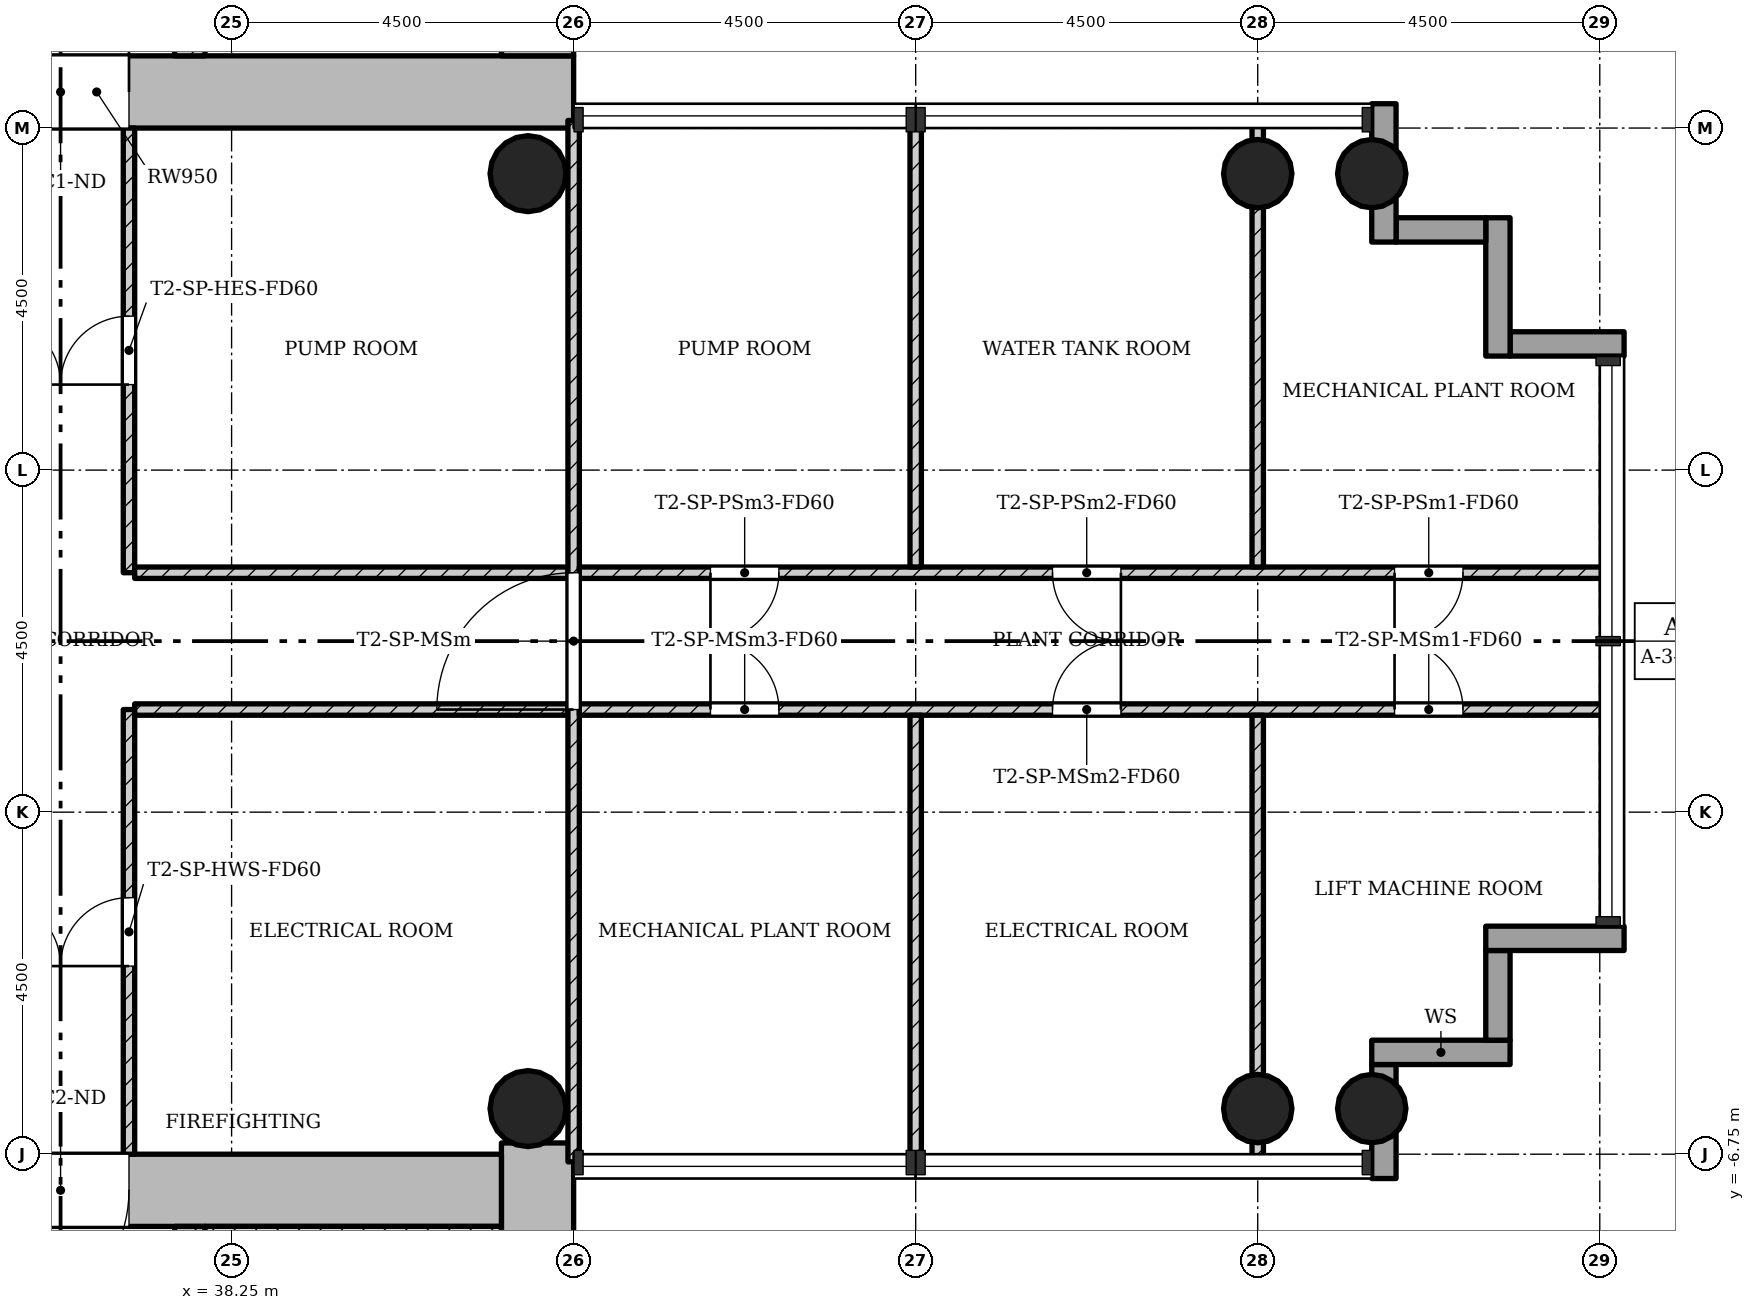
"""IFC4 building model, lengths in metres.
Left out: names, types, materials, properties, quantities, classifications, styles, units other than length and angle.
Written with IfcOpenShell. Run it as: python <this file> out.ifc"""

import sys

from ifc_helpers import new_model, si_unit, direction, frame, frame_2d, origin, origin_2d, place, context, subcontext, project, spatial, rectangle, hollow_circle, extrude, element, fill, save


model = new_model("IFC4")
c1 = context("Model", 3, precision=1e-05, world=origin(), true_north=direction((0.0, 1.0)))
c2 = subcontext(c1, "Body", "Model", "MODEL_VIEW")
j1 = project(units=[si_unit("LENGTHUNIT", "METRE"), si_unit("PLANEANGLEUNIT", "RADIAN")], contexts=[c1])
p1 = place(None, origin())
s1 = spatial("IfcSite", under=j1, at=p1, CompositionType="ELEMENT")
p2 = place(p1, origin())
s2 = spatial("IfcBuilding", under=s1, at=p2, CompositionType="ELEMENT")
p3 = place(p2, frame((0.0, 0.0, 124.2)))
s3 = spatial("IfcBuildingStorey", under=s2, at=p3, CompositionType="ELEMENT", Elevation=124.2)
p4 = place(p3, frame((30.2, 7.225, 0.0), z_axis=(0.0, 0.0, 1.0), x_axis=(1.0, 0.0, 0.0)))
e1 = element("IfcWall", 1, at=p4, inside=s3, PredefinedType="SHEAR", context=c2, shape_type="SweptSolid", body=[
    extrude(rectangle(XDim=12.55, YDim=0.95, at=frame_2d((6.275, 0.0))), origin(), (0.0, 0.0, 1.0), 4.5),
])
p5 = place(p4, frame((4.9, 0.0, 0.0)))
e2 = element("IfcOpeningElement", 2, at=p5, cuts=e1, PredefinedType="OPENING", context=c2, shape_type="SweptSolid", body=[
    extrude(rectangle(XDim=1.8, YDim=2.1, at=frame_2d((0.9, 1.05))), frame((0.0, 0.485, 0.0), z_axis=(0.0, -1.0, 0.0), x_axis=(1.0, 0.0, 0.0)), (0.0, 0.0, 1.0), 0.97),
])
p6 = place(p3, frame((42.275, 7.7, 0.0), z_axis=(0.0, 0.0, 1.0), x_axis=(0.0, 1.0, 0.0)))
e3 = element("IfcWall", 3, at=p6, inside=s3, PredefinedType="SHEAR", context=c2, shape_type="SweptSolid", body=[
    extrude(rectangle(XDim=8.05, YDim=0.95, at=frame_2d((4.025, 0.0))), origin(), (0.0, 0.0, 1.0), 4.5),
])
p7 = place(p3, frame((37.7, 7.7, 0.0), z_axis=(0.0, 0.0, 1.0), x_axis=(0.0, 1.0, 0.0)))
e4 = element("IfcWall", 4, at=p7, inside=s3, PredefinedType="SHEAR", context=c2, shape_type="SweptSolid", body=[
    extrude(rectangle(XDim=7.1, YDim=0.4, at=frame_2d((3.55, 0.0))), origin(), (0.0, 0.0, 1.0), 4.5),
])
p8 = place(p3, frame((42.275, -14.8, 0.0), z_axis=(0.0, 0.0, 1.0), x_axis=(0.0, 1.0, 0.0)))
e5 = element("IfcWall", 5, at=p8, inside=s3, PredefinedType="SHEAR", context=c2, shape_type="SweptSolid", body=[
    extrude(rectangle(XDim=8.198, YDim=0.95, at=frame_2d((4.099, 0.0))), origin(), (0.0, 0.0, 1.0), 4.5),
])
p9 = place(p3, frame((41.8, -7.225, 0.0), z_axis=(0.0, 0.0, 1.0), x_axis=(-1.0, 0.0, 0.0)))
e6 = element("IfcWall", 6, at=p9, inside=s3, PredefinedType="SHEAR", context=c2, shape_type="SweptSolid", body=[
    extrude(rectangle(XDim=12.55, YDim=0.95, at=frame_2d((6.275, 0.0))), origin(), (0.0, 0.0, 1.0), 4.5),
])
p10 = place(p9, frame((4.9, 0.0, 0.0)))
e7 = element("IfcOpeningElement", 7, at=p10, cuts=e6, PredefinedType="OPENING", context=c2, shape_type="SweptSolid", body=[
    extrude(rectangle(XDim=1.8, YDim=2.1, at=frame_2d((0.9, 1.05))), frame((0.0, 0.485, 0.0), z_axis=(0.0, -1.0, 0.0), x_axis=(1.0, 0.0, 0.0)), (0.0, 0.0, 1.0), 0.97),
])
p11 = place(p3, frame((37.7, -14.8, 0.0), z_axis=(0.0, 0.0, 1.0), x_axis=(0.0, 1.0, 0.0)))
e8 = element("IfcWall", 8, at=p11, inside=s3, PredefinedType="SHEAR", context=c2, shape_type="SweptSolid", body=[
    extrude(rectangle(XDim=7.1, YDim=0.4, at=frame_2d((3.55, 0.0))), origin(), (0.0, 0.0, 1.0), 4.5),
])
p12 = place(p11, frame((5.5, 0.0, 0.0)))
e9 = element("IfcOpeningElement", 9, at=p12, cuts=e8, PredefinedType="OPENING", context=c2, shape_type="SweptSolid", body=[
    extrude(rectangle(XDim=0.9, YDim=2.1, at=frame_2d((0.45, 1.05))), frame((0.0, 0.21, 0.0), z_axis=(0.0, -1.0, 0.0), x_axis=(1.0, 0.0, 0.0)), (0.0, 0.0, 1.0), 0.42),
])
for number, where, z_axis, x_axis in (
    (10, (51.75, -6.15, 0.0), (0.0, 0.0, 1.0), (1.0, 0.0, 0.0)),
    (11, (51.75, 6.15, 0.0), (0.0, 0.0, 1.0), (1.0, 0.0, 0.0)),
    (12, (53.25, -6.15, 0.0), (0.0, 0.0, 1.0), (1.0, 0.0, 0.0)),
    (13, (53.25, 6.15, 0.0), (0.0, 0.0, 1.0), (1.0, 0.0, 0.0)),
):
    element("IfcColumn", number, at=place(p3, frame(where, z_axis=z_axis, x_axis=x_axis)), inside=s3, PredefinedType="COLUMN", context=c2, shape_type="SweptSolid", body=[
        extrude(hollow_circle(Radius=0.45, WallThickness=0.032, at=origin_2d()), origin(), (0.0, 0.0, 1.0), 4.5),
    ])
for number, where, z_axis, x_axis in (
    (14, (42.15, -6.15, 0.0), (0.0, 0.0, 1.0), (1.0, 0.0, 0.0)),
    (15, (42.15, 6.15, 0.0), (0.0, 0.0, 1.0), (1.0, 0.0, 0.0)),
):
    element("IfcColumn", number, at=place(p3, frame(where, z_axis=z_axis, x_axis=x_axis)), inside=s3, PredefinedType="COLUMN", context=c2, shape_type="SweptSolid", body=[
        extrude(hollow_circle(Radius=0.5, WallThickness=0.036, at=origin_2d()), origin(), (0.0, 0.0, 1.0), 4.5),
    ])
p13 = place(p3, frame((53.41, -7.07, -0.3), z_axis=(0.0, 0.0, 1.0), x_axis=(0.0, 1.0, 0.0)))
e16 = element("IfcWall", 16, at=p13, inside=s3, PredefinedType="STANDARD", context=c2, shape_type="SweptSolid", body=[
    extrude(rectangle(XDim=1.5, YDim=0.32, at=frame_2d((0.75, 0.0))), origin(), (0.0, 0.0, 1.0), 4.5),
])
p14 = place(p3, frame((53.25, -5.41, -0.3), z_axis=(0.0, 0.0, 1.0), x_axis=(1.0, 0.0, 0.0)))
e17 = element("IfcWall", 17, at=p14, inside=s3, PredefinedType="STANDARD", context=c2, shape_type="SweptSolid", body=[
    extrude(rectangle(XDim=1.82, YDim=0.32, at=frame_2d((0.91, 0.0))), origin(), (0.0, 0.0, 1.0), 4.5),
])
p15 = place(p3, frame((54.91, -5.25, -0.3), z_axis=(0.0, 0.0, 1.0), x_axis=(0.0, 1.0, 0.0)))
e18 = element("IfcWall", 18, at=p15, inside=s3, PredefinedType="STANDARD", context=c2, shape_type="SweptSolid", body=[
    extrude(rectangle(XDim=1.18, YDim=0.32, at=frame_2d((0.59, 0.0))), origin(), (0.0, 0.0, 1.0), 4.5),
])
p16 = place(p3, frame((54.75, -3.91, -0.3), z_axis=(0.0, 0.0, 1.0), x_axis=(1.0, 0.0, 0.0)))
e19 = element("IfcWall", 19, at=p16, inside=s3, PredefinedType="STANDARD", context=c2, shape_type="SweptSolid", body=[
    extrude(rectangle(XDim=1.82, YDim=0.32, at=frame_2d((0.91, 0.0))), origin(), (0.0, 0.0, 1.0), 4.5),
])
p17 = place(p3, frame((56.57, 3.91, -0.3), z_axis=(0.0, 0.0, 1.0), x_axis=(-1.0, 0.0, 0.0)))
e20 = element("IfcWall", 20, at=p17, inside=s3, PredefinedType="STANDARD", context=c2, shape_type="SweptSolid", body=[
    extrude(rectangle(XDim=1.5, YDim=0.32, at=frame_2d((0.75, 0.0))), origin(), (0.0, 0.0, 1.0), 4.5),
])
p18 = place(p3, frame((54.91, 3.75, -0.3), z_axis=(0.0, 0.0, 1.0), x_axis=(0.0, 1.0, 0.0)))
e21 = element("IfcWall", 21, at=p18, inside=s3, PredefinedType="STANDARD", context=c2, shape_type="SweptSolid", body=[
    extrude(rectangle(XDim=1.82, YDim=0.32, at=frame_2d((0.91, 0.0))), origin(), (0.0, 0.0, 1.0), 4.5),
])
p19 = place(p3, frame((54.75, 5.41, -0.3), z_axis=(0.0, 0.0, 1.0), x_axis=(-1.0, 0.0, 0.0)))
e22 = element("IfcWall", 22, at=p19, inside=s3, PredefinedType="STANDARD", context=c2, shape_type="SweptSolid", body=[
    extrude(rectangle(XDim=1.18, YDim=0.32, at=frame_2d((0.59, 0.0))), origin(), (0.0, 0.0, 1.0), 4.5),
])
p20 = place(p3, frame((53.41, 5.25, -0.3), z_axis=(0.0, 0.0, 1.0), x_axis=(0.0, 1.0, 0.0)))
e23 = element("IfcWall", 23, at=p20, inside=s3, PredefinedType="STANDARD", context=c2, shape_type="SweptSolid", body=[
    extrude(rectangle(XDim=1.82, YDim=0.32, at=frame_2d((0.91, 0.0))), origin(), (0.0, 0.0, 1.0), 4.5),
])
p21 = place(p3, frame((36.9, 0.9, 0.0), z_axis=(0.0, 0.0, 1.0), x_axis=(0.0, 1.0, 0.0)))
e24 = element("IfcWall", 24, at=p21, inside=s3, PredefinedType="PARTITIONING", context=c2, shape_type="SweptSolid", body=[
    extrude(rectangle(XDim=5.85, YDim=0.15, at=frame_2d((2.925, 0.0))), origin(), (0.0, 0.0, 1.0), 4.1),
])
p22 = place(p21, frame((2.475, 0.0, 0.0)))
e25 = element("IfcOpeningElement", 25, at=p22, cuts=e24, PredefinedType="OPENING", context=c2, shape_type="SweptSolid", body=[
    extrude(rectangle(XDim=0.9, YDim=2.1, at=frame_2d((0.45, 1.05))), frame((0.0, 0.085, 0.0), z_axis=(0.0, -1.0, 0.0), x_axis=(1.0, 0.0, 0.0)), (0.0, 0.0, 1.0), 0.17),
])
p23 = place(p3, frame((42.675, 0.9, 0.0), z_axis=(0.0, 0.0, 1.0), x_axis=(-1.0, 0.0, 0.0)))
e26 = element("IfcWall", 26, at=p23, inside=s3, PredefinedType="PARTITIONING", context=c2, shape_type="SweptSolid", body=[
    extrude(rectangle(XDim=5.7, YDim=0.15, at=frame_2d((2.85, 0.0))), origin(), (0.0, 0.0, 1.0), 4.1),
])
p24 = place(p3, frame((36.9, -6.75, 0.0), z_axis=(0.0, 0.0, 1.0), x_axis=(0.0, 1.0, 0.0)))
e27 = element("IfcWall", 27, at=p24, inside=s3, PredefinedType="PARTITIONING", context=c2, shape_type="SweptSolid", body=[
    extrude(rectangle(XDim=5.85, YDim=0.15, at=frame_2d((2.925, 0.0))), origin(), (0.0, 0.0, 1.0), 4.1),
])
p25 = place(p24, frame((2.475, 0.0, 0.0)))
e28 = element("IfcOpeningElement", 28, at=p25, cuts=e27, PredefinedType="OPENING", context=c2, shape_type="SweptSolid", body=[
    extrude(rectangle(XDim=0.9, YDim=2.1, at=frame_2d((0.45, 1.05))), frame((0.0, 0.085, 0.0), z_axis=(0.0, -1.0, 0.0), x_axis=(1.0, 0.0, 0.0)), (0.0, 0.0, 1.0), 0.17),
])
p26 = place(p3, frame((42.675, -0.9, 0.0), z_axis=(0.0, 0.0, 1.0), x_axis=(-1.0, 0.0, 0.0)))
e29 = element("IfcWall", 29, at=p26, inside=s3, PredefinedType="PARTITIONING", context=c2, shape_type="SweptSolid", body=[
    extrude(rectangle(XDim=5.7, YDim=0.15, at=frame_2d((2.85, 0.0))), origin(), (0.0, 0.0, 1.0), 4.1),
])
p27 = place(p3, frame((42.75, -6.85, 0.0), z_axis=(0.0, 0.0, 1.0), x_axis=(0.0, 1.0, 0.0)))
e30 = element("IfcWall", 30, at=p27, inside=s3, PredefinedType="PARTITIONING", context=c2, shape_type="SweptSolid", body=[
    extrude(rectangle(XDim=13.7, YDim=0.15, at=frame_2d((6.85, 0.0))), origin(), (0.0, 0.0, 1.0), 4.1),
])
p28 = place(p27, frame((5.95, 0.0, 0.0)))
e31 = element("IfcOpeningElement", 31, at=p28, cuts=e30, PredefinedType="OPENING", context=c2, shape_type="SweptSolid", body=[
    extrude(rectangle(XDim=1.8, YDim=2.1, at=frame_2d((0.9, 1.05))), frame((0.0, 0.085, 0.0), z_axis=(0.0, -1.0, 0.0), x_axis=(1.0, 0.0, 0.0)), (0.0, 0.0, 1.0), 0.17),
])
p29 = place(p3, frame((56.35, 0.9, 0.0), z_axis=(0.0, 0.0, 1.0), x_axis=(-1.0, 0.0, 0.0)))
e32 = element("IfcWall", 32, at=p29, inside=s3, PredefinedType="PARTITIONING", context=c2, shape_type="SweptSolid", body=[
    extrude(rectangle(XDim=13.525, YDim=0.15, at=frame_2d((6.763, 0.0))), origin(), (0.0, 0.0, 1.0), 4.1),
])
p30 = place(p29, frame((1.9, 0.0, 0.0)))
e33 = element("IfcOpeningElement", 33, at=p30, cuts=e32, PredefinedType="OPENING", context=c2, shape_type="SweptSolid", body=[
    extrude(rectangle(XDim=0.9, YDim=2.1, at=frame_2d((0.45, 1.05))), frame((0.0, 0.085, 0.0), z_axis=(0.0, -1.0, 0.0), x_axis=(1.0, 0.0, 0.0)), (0.0, 0.0, 1.0), 0.17),
])
p31 = place(p29, frame((6.4, 0.0, 0.0)))
e34 = element("IfcOpeningElement", 34, at=p31, cuts=e32, PredefinedType="OPENING", context=c2, shape_type="SweptSolid", body=[
    extrude(rectangle(XDim=0.9, YDim=2.1, at=frame_2d((0.45, 1.05))), frame((0.0, 0.085, 0.0), z_axis=(0.0, -1.0, 0.0), x_axis=(1.0, 0.0, 0.0)), (0.0, 0.0, 1.0), 0.17),
])
p32 = place(p29, frame((10.9, 0.0, 0.0)))
e35 = element("IfcOpeningElement", 35, at=p32, cuts=e32, PredefinedType="OPENING", context=c2, shape_type="SweptSolid", body=[
    extrude(rectangle(XDim=0.9, YDim=2.1, at=frame_2d((0.45, 1.05))), frame((0.0, 0.085, 0.0), z_axis=(0.0, -1.0, 0.0), x_axis=(1.0, 0.0, 0.0)), (0.0, 0.0, 1.0), 0.17),
])
for number, where, z_axis, x_axis in (
    (36, (51.75, 0.975, 0.0), (0.0, 0.0, 1.0), (0.0, 1.0, 0.0)),
    (37, (47.25, 0.975, 0.0), (0.0, 0.0, 1.0), (0.0, 1.0, 0.0)),
):
    element("IfcWall", number, at=place(p3, frame(where, z_axis=z_axis, x_axis=x_axis)), inside=s3, PredefinedType="PARTITIONING", context=c2, shape_type="SweptSolid", body=[
        extrude(rectangle(XDim=5.875, YDim=0.15, at=frame_2d((2.938, 0.0))), origin(), (0.0, 0.0, 1.0), 4.1),
    ])
p33 = place(p3, frame((56.35, -0.9, 0.0), z_axis=(0.0, 0.0, 1.0), x_axis=(-1.0, 0.0, 0.0)))
e38 = element("IfcWall", 38, at=p33, inside=s3, PredefinedType="PARTITIONING", context=c2, shape_type="SweptSolid", body=[
    extrude(rectangle(XDim=13.525, YDim=0.15, at=frame_2d((6.763, 0.0))), origin(), (0.0, 0.0, 1.0), 4.1),
])
p34 = place(p33, frame((1.9, 0.0, 0.0)))
e39 = element("IfcOpeningElement", 39, at=p34, cuts=e38, PredefinedType="OPENING", context=c2, shape_type="SweptSolid", body=[
    extrude(rectangle(XDim=0.9, YDim=2.1, at=frame_2d((0.45, 1.05))), frame((0.0, 0.085, 0.0), z_axis=(0.0, -1.0, 0.0), x_axis=(1.0, 0.0, 0.0)), (0.0, 0.0, 1.0), 0.17),
])
p35 = place(p33, frame((6.4, 0.0, 0.0)))
e40 = element("IfcOpeningElement", 40, at=p35, cuts=e38, PredefinedType="OPENING", context=c2, shape_type="SweptSolid", body=[
    extrude(rectangle(XDim=0.9, YDim=2.1, at=frame_2d((0.45, 1.05))), frame((0.0, 0.085, 0.0), z_axis=(0.0, -1.0, 0.0), x_axis=(1.0, 0.0, 0.0)), (0.0, 0.0, 1.0), 0.17),
])
p36 = place(p33, frame((10.9, 0.0, 0.0)))
e41 = element("IfcOpeningElement", 41, at=p36, cuts=e38, PredefinedType="OPENING", context=c2, shape_type="SweptSolid", body=[
    extrude(rectangle(XDim=0.9, YDim=2.1, at=frame_2d((0.45, 1.05))), frame((0.0, 0.085, 0.0), z_axis=(0.0, -1.0, 0.0), x_axis=(1.0, 0.0, 0.0)), (0.0, 0.0, 1.0), 0.17),
])
for number, where, z_axis, x_axis in (
    (42, (51.75, -0.975, 0.0), (0.0, 0.0, 1.0), (0.0, -1.0, 0.0)),
    (43, (47.25, -0.975, 0.0), (0.0, 0.0, 1.0), (0.0, -1.0, 0.0)),
):
    element("IfcWall", number, at=place(p3, frame(where, z_axis=z_axis, x_axis=x_axis)), inside=s3, PredefinedType="PARTITIONING", context=c2, shape_type="SweptSolid", body=[
        extrude(rectangle(XDim=5.875, YDim=0.15, at=frame_2d((2.938, 0.0))), origin(), (0.0, 0.0, 1.0), 4.1),
    ])
p37 = place(p3, frame((37.9, -7.825, 0.0), z_axis=(0.0, 0.0, 1.0), x_axis=(1.0, 0.0, 0.0)))
e44 = element("IfcWall", 44, at=p37, inside=s3, PredefinedType="SHEAR", context=c2, shape_type="SweptSolid", body=[
    extrude(rectangle(XDim=3.9, YDim=0.25, at=frame_2d((1.95, 0.0))), origin(), (0.0, 0.0, 1.0), 4.5),
])
p38 = place(p22, origin())
e45 = element("IfcDoor", 45, at=p38, inside=s3, OperationType="SINGLE_SWING_RIGHT", PredefinedType="DOOR", context=c2, shape_type="SweptSolid", body=[
    extrude(rectangle(XDim=0.9, YDim=2.1, at=frame_2d((0.45, 1.05))), frame((0.0, 0.025, 0.0), z_axis=(0.0, -1.0, 0.0), x_axis=(1.0, 0.0, 0.0)), (0.0, 0.0, 1.0), 0.05),
])
fill(e25, e45)
p39 = place(p25, origin())
e46 = element("IfcDoor", 46, at=p39, inside=s3, OperationType="SINGLE_SWING_RIGHT", PredefinedType="DOOR", context=c2, shape_type="SweptSolid", body=[
    extrude(rectangle(XDim=0.9, YDim=2.1, at=frame_2d((0.45, 1.05))), frame((0.0, 0.025, 0.0), z_axis=(0.0, -1.0, 0.0), x_axis=(1.0, 0.0, 0.0)), (0.0, 0.0, 1.0), 0.05),
])
fill(e28, e46)
p40 = place(p28, origin())
e47 = element("IfcDoor", 47, at=p40, inside=s3, OperationType="SINGLE_SWING_RIGHT", PredefinedType="DOOR", context=c2, shape_type="SweptSolid", body=[
    extrude(rectangle(XDim=1.8, YDim=2.1, at=frame_2d((0.9, 1.05))), frame((0.0, 0.025, 0.0), z_axis=(0.0, -1.0, 0.0), x_axis=(1.0, 0.0, 0.0)), (0.0, 0.0, 1.0), 0.05),
])
fill(e31, e47)
p41 = place(p30, origin())
e48 = element("IfcDoor", 48, at=p41, inside=s3, OperationType="SINGLE_SWING_LEFT", PredefinedType="DOOR", context=c2, shape_type="SweptSolid", body=[
    extrude(rectangle(XDim=0.9, YDim=2.1, at=frame_2d((0.45, 1.05))), frame((0.0, 0.025, 0.0), z_axis=(0.0, -1.0, 0.0), x_axis=(1.0, 0.0, 0.0)), (0.0, 0.0, 1.0), 0.05),
])
fill(e33, e48)
p42 = place(p31, origin())
e49 = element("IfcDoor", 49, at=p42, inside=s3, OperationType="SINGLE_SWING_RIGHT", PredefinedType="DOOR", context=c2, shape_type="SweptSolid", body=[
    extrude(rectangle(XDim=0.9, YDim=2.1, at=frame_2d((0.45, 1.05))), frame((0.0, 0.025, 0.0), z_axis=(0.0, -1.0, 0.0), x_axis=(1.0, 0.0, 0.0)), (0.0, 0.0, 1.0), 0.05),
])
fill(e34, e49)
p43 = place(p32, origin())
e50 = element("IfcDoor", 50, at=p43, inside=s3, OperationType="SINGLE_SWING_LEFT", PredefinedType="DOOR", context=c2, shape_type="SweptSolid", body=[
    extrude(rectangle(XDim=0.9, YDim=2.1, at=frame_2d((0.45, 1.05))), frame((0.0, 0.025, 0.0), z_axis=(0.0, -1.0, 0.0), x_axis=(1.0, 0.0, 0.0)), (0.0, 0.0, 1.0), 0.05),
])
fill(e35, e50)
p44 = place(p34, origin())
e51 = element("IfcDoor", 51, at=p44, inside=s3, OperationType="SINGLE_SWING_RIGHT", PredefinedType="DOOR", context=c2, shape_type="SweptSolid", body=[
    extrude(rectangle(XDim=0.9, YDim=2.1, at=frame_2d((0.45, 1.05))), frame((0.0, 0.025, 0.0), z_axis=(0.0, -1.0, 0.0), x_axis=(1.0, 0.0, 0.0)), (0.0, 0.0, 1.0), 0.05),
])
fill(e39, e51)
p45 = place(p35, origin())
e52 = element("IfcDoor", 52, at=p45, inside=s3, OperationType="SINGLE_SWING_LEFT", PredefinedType="DOOR", context=c2, shape_type="SweptSolid", body=[
    extrude(rectangle(XDim=0.9, YDim=2.1, at=frame_2d((0.45, 1.05))), frame((0.0, 0.025, 0.0), z_axis=(0.0, -1.0, 0.0), x_axis=(1.0, 0.0, 0.0)), (0.0, 0.0, 1.0), 0.05),
])
fill(e40, e52)
p46 = place(p36, origin())
e53 = element("IfcDoor", 53, at=p46, inside=s3, OperationType="SINGLE_SWING_RIGHT", PredefinedType="DOOR", context=c2, shape_type="SweptSolid", body=[
    extrude(rectangle(XDim=0.9, YDim=2.1, at=frame_2d((0.45, 1.05))), frame((0.0, 0.025, 0.0), z_axis=(0.0, -1.0, 0.0), x_axis=(1.0, 0.0, 0.0)), (0.0, 0.0, 1.0), 0.05),
])
fill(e41, e53)
p47 = place(p5, origin())
e54 = element("IfcDoor", 54, at=p47, inside=s3, OperationType="SINGLE_SWING_LEFT", PredefinedType="DOOR", context=c2, shape_type="SweptSolid", body=[
    extrude(rectangle(XDim=1.8, YDim=2.1, at=frame_2d((0.9, 1.05))), frame((0.0, 0.025, 0.0), z_axis=(0.0, -1.0, 0.0), x_axis=(1.0, 0.0, 0.0)), (0.0, 0.0, 1.0), 0.05),
])
fill(e2, e54)
p48 = place(p10, origin())
e55 = element("IfcDoor", 55, at=p48, inside=s3, OperationType="SINGLE_SWING_LEFT", PredefinedType="DOOR", context=c2, shape_type="SweptSolid", body=[
    extrude(rectangle(XDim=1.8, YDim=2.1, at=frame_2d((0.9, 1.05))), frame((0.0, 0.025, 0.0), z_axis=(0.0, -1.0, 0.0), x_axis=(1.0, 0.0, 0.0)), (0.0, 0.0, 1.0), 0.05),
])
fill(e7, e55)
save(model, sys.argv[1])
